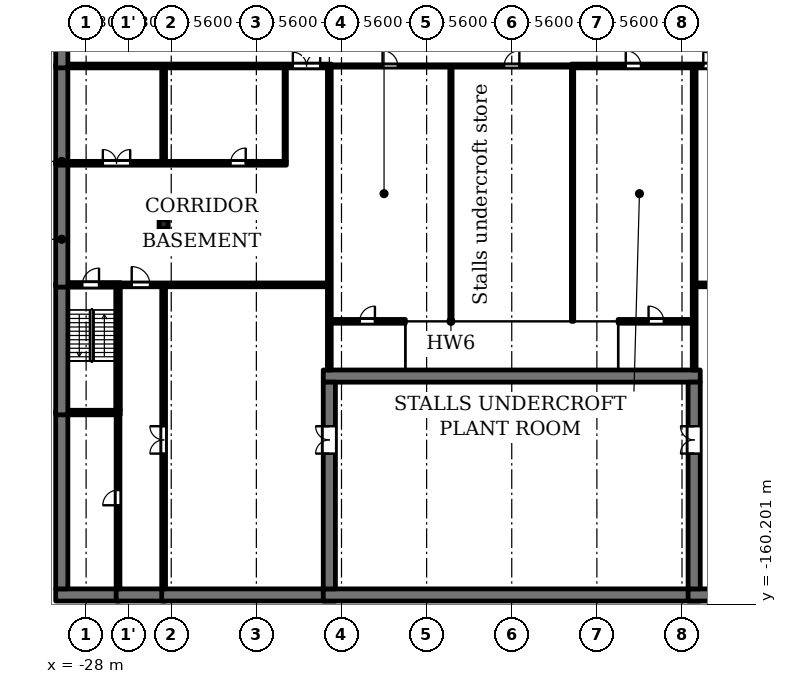
"""IFC4 building model, lengths in metres.
Left out: names, types, materials, properties, quantities, classifications, styles, units other than length and angle.
Written with IfcOpenShell. Run it as: python <this file> out.ifc"""

import sys

from ifc_helpers import new_model, si_unit, direction, frame, frame_2d, origin, origin_2d, place, context, subcontext, project, spatial, rectangle, extrude, element, fill, save


model = new_model("IFC4")
c1 = context("Model", 3, precision=1e-05, world=origin(), true_north=direction((0.0, 1.0)))
c2 = subcontext(c1, "Body", "Model", "MODEL_VIEW")
j1 = project(units=[si_unit("LENGTHUNIT", "METRE"), si_unit("PLANEANGLEUNIT", "RADIAN")], contexts=[c1])
p1 = place(None, origin())
s1 = spatial("IfcSite", under=j1, at=p1, CompositionType="ELEMENT")
p2 = place(p1, origin())
s2 = spatial("IfcBuilding", under=s1, at=p2, CompositionType="ELEMENT")
p3 = place(p2, frame((0.0, 0.0, -4.5)))
s3 = spatial("IfcBuildingStorey", under=s2, at=p3, CompositionType="ELEMENT", Elevation=-4.5)
p4 = place(p3, frame((-22.9, -135.2, 0.0), z_axis=(0.0, 0.0, 1.0), x_axis=(1.0, 0.0, 0.0)))
e1 = element("IfcColumn", 1, at=p4, inside=s3, PredefinedType="COLUMN", context=c2, shape_type="SweptSolid", body=[
    extrude(rectangle(XDim=0.6, YDim=0.6, at=origin_2d()), origin(), (0.0, 0.0, 1.0), 4.15),
])
p5 = place(p3, frame((-30.0, -159.6, 0.0), z_axis=(0.0, 0.0, 1.0), x_axis=(1.0, 0.0, 0.0)))
e2 = element("IfcWall", 2, at=p5, inside=s3, PredefinedType="SOLIDWALL", context=c2, shape_type="SweptSolid", body=[
    extrude(rectangle(XDim=4.225, YDim=0.8, at=frame_2d((2.112, 0.0))), origin(), (0.0, 0.0, 1.0), 4.15),
])
p6 = place(p3, frame((-26.025, -159.6, 0.0), z_axis=(0.0, 0.0, 1.0), x_axis=(1.0, 0.0, 0.0)))
e3 = element("IfcWall", 3, at=p6, inside=s3, PredefinedType="SOLIDWALL", context=c2, shape_type="SweptSolid", body=[
    extrude(rectangle(XDim=3.25, YDim=0.8, at=frame_2d((1.625, 0.0))), origin(), (0.0, 0.0, 1.0), 4.15),
])
p7 = place(p3, frame((-23.025, -159.6, 0.0), z_axis=(0.0, 0.0, 1.0), x_axis=(1.0, 0.0, 0.0)))
e4 = element("IfcWall", 4, at=p7, inside=s3, PredefinedType="SOLIDWALL", context=c2, shape_type="SweptSolid", body=[
    extrude(rectangle(XDim=11.425, YDim=0.8, at=frame_2d((5.712, 0.0))), origin(), (0.0, 0.0, 1.0), 4.15),
])
p8 = place(p3, frame((-12.4, -159.6, 0.0), z_axis=(0.0, 0.0, 1.0), x_axis=(1.0, 0.0, 0.0)))
e5 = element("IfcWall", 5, at=p8, inside=s3, PredefinedType="SOLIDWALL", context=c2, shape_type="SweptSolid", body=[
    extrude(rectangle(XDim=24.8, YDim=0.8, at=frame_2d((12.4, 0.0))), origin(), (0.0, 0.0, 1.0), 4.5),
])
p9 = place(p3, frame((11.6, -159.6, 0.0), z_axis=(0.0, 0.0, 1.0), x_axis=(1.0, 0.0, 0.0)))
e6 = element("IfcWall", 6, at=p9, inside=s3, PredefinedType="SOLIDWALL", context=c2, shape_type="SweptSolid", body=[
    extrude(rectangle(XDim=11.425, YDim=0.8, at=frame_2d((5.712, 0.0))), origin(), (0.0, 0.0, 1.0), 4.15),
])
p10 = place(p3, frame((-29.2, -147.6, 0.0), z_axis=(0.0, 0.0, 1.0), x_axis=(1.0, 0.0, 0.0)))
e7 = element("IfcWall", 7, at=p10, inside=s3, PredefinedType="SOLIDWALL", context=c2, shape_type="SweptSolid", body=[
    extrude(rectangle(XDim=3.45, YDim=0.3, at=frame_2d((1.725, 0.0))), origin(), (0.0, 0.0, 1.0), 4.15),
])
p11 = place(p3, frame((-12.4, -145.2, 0.0), z_axis=(0.0, 0.0, 1.0), x_axis=(1.0, 0.0, 0.0)))
e8 = element("IfcWall", 8, at=p11, inside=s3, PredefinedType="SOLIDWALL", context=c2, shape_type="SweptSolid", body=[
    extrude(rectangle(XDim=24.8, YDim=0.8, at=frame_2d((12.4, 0.0))), origin(), (0.0, 0.0, 1.0), 4.5),
])
p12 = place(p3, frame((-11.875, -141.6, 0.0), z_axis=(0.0, 0.0, 1.0), x_axis=(1.0, 0.0, 0.0)))
e9 = element("IfcWall", 9, at=p12, inside=s3, PredefinedType="SOLIDWALL", context=c2, shape_type="SweptSolid", body=[
    extrude(rectangle(XDim=4.875, YDim=0.25, at=frame_2d((2.438, 0.0))), origin(), (0.0, 0.0, 1.0), 3.2),
])
p13 = place(p12, frame((1.875, 0.0, 0.0)))
e10 = element("IfcOpeningElement", 10, at=p13, cuts=e9, PredefinedType="OPENING", context=c2, shape_type="SweptSolid", body=[
    extrude(rectangle(XDim=1.0, YDim=2.1, at=frame_2d((0.5, 1.05))), frame((0.0, 0.135, 0.0), z_axis=(0.0, -1.0, 0.0), x_axis=(1.0, 0.0, 0.0)), (0.0, 0.0, 1.0), 0.27),
])
p14 = place(p3, frame((7.0, -141.6, 0.0), z_axis=(0.0, 0.0, 1.0), x_axis=(1.0, 0.0, 0.0)))
e11 = element("IfcWall", 11, at=p14, inside=s3, PredefinedType="SOLIDWALL", context=c2, shape_type="SweptSolid", body=[
    extrude(rectangle(XDim=4.875, YDim=0.25, at=frame_2d((2.438, 0.0))), origin(), (0.0, 0.0, 1.0), 3.2),
])
p15 = place(p14, frame((2.0, 0.0, 0.0)))
e12 = element("IfcOpeningElement", 12, at=p15, cuts=e11, PredefinedType="OPENING", context=c2, shape_type="SweptSolid", body=[
    extrude(rectangle(XDim=1.0, YDim=2.1, at=frame_2d((0.5, 1.05))), frame((0.0, 0.135, 0.0), z_axis=(0.0, -1.0, 0.0), x_axis=(1.0, 0.0, 0.0)), (0.0, 0.0, 1.0), 0.27),
])
p16 = place(p3, frame((-29.2, -139.2, 0.0), z_axis=(0.0, 0.0, 1.0), x_axis=(1.0, 0.0, 0.0)))
e13 = element("IfcWall", 13, at=p16, inside=s3, PredefinedType="SOLIDWALL", context=c2, shape_type="SweptSolid", body=[
    extrude(rectangle(XDim=3.45, YDim=0.3, at=frame_2d((1.725, 0.0))), origin(), (0.0, 0.0, 1.0), 4.15),
])
p17 = place(p16, frame((0.95, 0.0, 0.0)))
e14 = element("IfcOpeningElement", 14, at=p17, cuts=e13, PredefinedType="OPENING", context=c2, shape_type="SweptSolid", body=[
    extrude(rectangle(XDim=1.1, YDim=2.1, at=frame_2d((0.55, 1.05))), frame((0.0, 0.16, 0.0), z_axis=(0.0, -1.0, 0.0), x_axis=(1.0, 0.0, 0.0)), (0.0, 0.0, 1.0), 0.32),
])
p18 = place(p3, frame((-25.75, -139.2, 0.0), z_axis=(0.0, 0.0, 1.0), x_axis=(1.0, 0.0, 0.0)))
e15 = element("IfcWall", 15, at=p18, inside=s3, PredefinedType="SOLIDWALL", context=c2, shape_type="SweptSolid", body=[
    extrude(rectangle(XDim=13.625, YDim=0.25, at=frame_2d((6.812, 0.0))), origin(), (0.0, 0.0, 1.0), 4.15),
])
p19 = place(p18, frame((0.75, 0.0, 0.0)))
e16 = element("IfcOpeningElement", 16, at=p19, cuts=e15, PredefinedType="OPENING", context=c2, shape_type="SweptSolid", body=[
    extrude(rectangle(XDim=1.2, YDim=2.1, at=frame_2d((0.6, 1.05))), frame((0.0, 0.135, 0.0), z_axis=(0.0, -1.0, 0.0), x_axis=(1.0, 0.0, 0.0)), (0.0, 0.0, 1.0), 0.27),
])
p20 = place(p3, frame((12.125, -139.2, 0.0), z_axis=(0.0, 0.0, 1.0), x_axis=(1.0, 0.0, 0.0)))
e17 = element("IfcWall", 17, at=p20, inside=s3, PredefinedType="SOLIDWALL", context=c2, shape_type="SweptSolid", body=[
    extrude(rectangle(XDim=13.625, YDim=0.25, at=frame_2d((6.812, 0.0))), origin(), (0.0, 0.0, 1.0), 4.15),
])
p21 = place(p20, frame((11.675, 0.0, 0.0)))
e18 = element("IfcOpeningElement", 18, at=p21, cuts=e17, PredefinedType="OPENING", context=c2, shape_type="SweptSolid", body=[
    extrude(rectangle(XDim=1.2, YDim=2.1, at=frame_2d((0.6, 1.05))), frame((0.0, 0.135, 0.0), z_axis=(0.0, -1.0, 0.0), x_axis=(1.0, 0.0, 0.0)), (0.0, 0.0, 1.0), 0.27),
])
p22 = place(p3, frame((-29.2, -131.2, 0.0), z_axis=(0.0, 0.0, 1.0), x_axis=(1.0, 0.0, 0.0)))
e19 = element("IfcWall", 19, at=p22, inside=s3, PredefinedType="SOLIDWALL", context=c2, shape_type="SweptSolid", body=[
    extrude(rectangle(XDim=14.375, YDim=0.25, at=frame_2d((7.188, 0.0))), origin(), (0.0, 0.0, 1.0), 4.15),
])
p23 = place(p22, frame((2.3, 0.0, 0.0)))
e20 = element("IfcOpeningElement", 20, at=p23, cuts=e19, PredefinedType="OPENING", context=c2, shape_type="SweptSolid", body=[
    extrude(rectangle(XDim=1.8, YDim=2.1, at=frame_2d((0.9, 1.05))), frame((0.0, 0.135, 0.0), z_axis=(0.0, -1.0, 0.0), x_axis=(1.0, 0.0, 0.0)), (0.0, 0.0, 1.0), 0.27),
])
p24 = place(p22, frame((10.7, 0.0, 0.0)))
e21 = element("IfcOpeningElement", 21, at=p24, cuts=e19, PredefinedType="OPENING", context=c2, shape_type="SweptSolid", body=[
    extrude(rectangle(XDim=1.0, YDim=2.1, at=frame_2d((0.5, 1.05))), frame((0.0, 0.135, 0.0), z_axis=(0.0, -1.0, 0.0), x_axis=(1.0, 0.0, 0.0)), (0.0, 0.0, 1.0), 0.27),
])
p25 = place(p3, frame((-29.2, -124.8, 0.0), z_axis=(0.0, 0.0, 1.0), x_axis=(1.0, 0.0, 0.0)))
e22 = element("IfcWall", 22, at=p25, inside=s3, PredefinedType="SOLIDWALL", context=c2, shape_type="SweptSolid", body=[
    extrude(rectangle(XDim=17.325, YDim=0.25, at=frame_2d((8.663, 0.0))), origin(), (0.0, 0.0, 1.0), 4.15),
])
p26 = place(p25, frame((14.8, 0.0, 0.0)))
e23 = element("IfcOpeningElement", 23, at=p26, cuts=e22, PredefinedType="OPENING", context=c2, shape_type="SweptSolid", body=[
    extrude(rectangle(XDim=1.8, YDim=2.1, at=frame_2d((0.9, 1.05))), frame((0.0, 0.135, 0.0), z_axis=(0.0, -1.0, 0.0), x_axis=(1.0, 0.0, 0.0)), (0.0, 0.0, 1.0), 0.27),
])
p27 = place(p3, frame((-11.875, -124.8, 0.0), z_axis=(0.0, 0.0, 1.0), x_axis=(1.0, 0.0, 0.0)))
e24 = element("IfcWall", 24, at=p27, inside=s3, PredefinedType="PARTITIONING", context=c2, shape_type="SweptSolid", body=[
    extrude(rectangle(XDim=15.95, YDim=0.15, at=frame_2d((7.975, 0.0))), origin(), (0.0, 0.0, 1.0), 4.15),
])
p28 = place(p27, frame((3.375, 0.0, 0.0)))
e25 = element("IfcOpeningElement", 25, at=p28, cuts=e24, PredefinedType="OPENING", context=c2, shape_type="SweptSolid", body=[
    extrude(rectangle(XDim=1.0, YDim=2.1, at=frame_2d((0.5, 1.05))), frame((0.0, 0.085, 0.0), z_axis=(0.0, -1.0, 0.0), x_axis=(1.0, 0.0, 0.0)), (0.0, 0.0, 1.0), 0.17),
])
p29 = place(p27, frame((11.375, 0.0, 0.0)))
e26 = element("IfcOpeningElement", 26, at=p29, cuts=e24, PredefinedType="OPENING", context=c2, shape_type="SweptSolid", body=[
    extrude(rectangle(XDim=1.0, YDim=2.1, at=frame_2d((0.5, 1.05))), frame((0.0, 0.085, 0.0), z_axis=(0.0, -1.0, 0.0), x_axis=(1.0, 0.0, 0.0)), (0.0, 0.0, 1.0), 0.17),
])
p30 = place(p3, frame((3.925, -124.8, 0.0), z_axis=(0.0, 0.0, 1.0), x_axis=(1.0, 0.0, 0.0)))
e27 = element("IfcWall", 27, at=p30, inside=s3, PredefinedType="SOLIDWALL", context=c2, shape_type="SweptSolid", body=[
    extrude(rectangle(XDim=25.275, YDim=0.25, at=frame_2d((12.637, 0.0))), origin(), (0.0, 0.0, 1.0), 4.15),
])
p31 = place(p30, frame((8.675, 0.0, 0.0)))
e28 = element("IfcOpeningElement", 28, at=p31, cuts=e27, PredefinedType="OPENING", context=c2, shape_type="SweptSolid", body=[
    extrude(rectangle(XDim=1.8, YDim=2.1, at=frame_2d((0.9, 1.05))), frame((0.0, 0.135, 0.0), z_axis=(0.0, -1.0, 0.0), x_axis=(1.0, 0.0, 0.0)), (0.0, 0.0, 1.0), 0.27),
])
p32 = place(p30, frame((3.575, 0.0, 0.0)))
e29 = element("IfcOpeningElement", 29, at=p32, cuts=e27, PredefinedType="OPENING", context=c2, shape_type="SweptSolid", body=[
    extrude(rectangle(XDim=1.0, YDim=2.1, at=frame_2d((0.5, 1.05))), frame((0.0, 0.135, 0.0), z_axis=(0.0, -1.0, 0.0), x_axis=(1.0, 0.0, 0.0)), (0.0, 0.0, 1.0), 0.27),
])
p33 = place(p3, frame((-29.6, -159.2, 0.0), z_axis=(0.0, 0.0, 1.0), x_axis=(0.0, 1.0, 0.0)))
e30 = element("IfcWall", 30, at=p33, inside=s3, PredefinedType="SOLIDWALL", context=c2, shape_type="SweptSolid", body=[
    extrude(rectangle(XDim=11.75, YDim=0.8, at=frame_2d((5.875, 0.0))), origin(), (0.0, 0.0, 1.0), 4.15),
])
p34 = place(p3, frame((-29.6, -147.75, 0.0), z_axis=(0.0, 0.0, 1.0), x_axis=(0.0, 1.0, 0.0)))
e31 = element("IfcWall", 31, at=p34, inside=s3, PredefinedType="SOLIDWALL", context=c2, shape_type="SweptSolid", body=[
    extrude(rectangle(XDim=8.7, YDim=0.8, at=frame_2d((4.35, 0.0))), origin(), (0.0, 0.0, 1.0), 4.15),
])
p35 = place(p3, frame((-29.6, -139.35, 0.0), z_axis=(0.0, 0.0, 1.0), x_axis=(0.0, 1.0, 0.0)))
e32 = element("IfcWall", 32, at=p35, inside=s3, PredefinedType="SOLIDWALL", context=c2, shape_type="SweptSolid", body=[
    extrude(rectangle(XDim=8.275, YDim=0.8, at=frame_2d((4.137, 0.0))), origin(), (0.0, 0.0, 1.0), 4.15),
])
p36 = place(p3, frame((-29.6, -131.325, 0.0), z_axis=(0.0, 0.0, 1.0), x_axis=(0.0, 1.0, 0.0)))
e33 = element("IfcWall", 33, at=p36, inside=s3, PredefinedType="SOLIDWALL", context=c2, shape_type="SweptSolid", body=[
    extrude(rectangle(XDim=6.65, YDim=0.8, at=frame_2d((3.325, 0.0))), origin(), (0.0, 0.0, 1.0), 4.15),
])
p37 = place(p3, frame((-29.6, -124.925, 0.0), z_axis=(0.0, 0.0, 1.0), x_axis=(0.0, 1.0, 0.0)))
e34 = element("IfcWall", 34, at=p37, inside=s3, PredefinedType="SOLIDWALL", context=c2, shape_type="SweptSolid", body=[
    extrude(rectangle(XDim=3.875, YDim=0.8, at=frame_2d((1.938, 0.0))), origin(), (0.0, 0.0, 1.0), 4.15),
])
p38 = place(p3, frame((-25.9, -159.2, 0.0), z_axis=(0.0, 0.0, 1.0), x_axis=(0.0, 1.0, 0.0)))
e35 = element("IfcWall", 35, at=p38, inside=s3, PredefinedType="SOLIDWALL", context=c2, shape_type="SweptSolid", body=[
    extrude(rectangle(XDim=11.45, YDim=0.25, at=frame_2d((5.725, 0.0))), origin(), (0.0, 0.0, 1.0), 4.15),
])
p39 = place(p38, frame((5.5, 0.0, 0.0)))
e36 = element("IfcOpeningElement", 36, at=p39, cuts=e35, PredefinedType="OPENING", context=c2, shape_type="SweptSolid", body=[
    extrude(rectangle(XDim=1.0, YDim=2.1, at=frame_2d((0.5, 1.05))), frame((0.0, 0.135, 0.0), z_axis=(0.0, -1.0, 0.0), x_axis=(1.0, 0.0, 0.0)), (0.0, 0.0, 1.0), 0.27),
])
p40 = place(p3, frame((-25.9, -147.45, 0.0), z_axis=(0.0, 0.0, 1.0), x_axis=(0.0, 1.0, 0.0)))
e37 = element("IfcWall", 37, at=p40, inside=s3, PredefinedType="SOLIDWALL", context=c2, shape_type="SweptSolid", body=[
    extrude(rectangle(XDim=8.225, YDim=0.3, at=frame_2d((4.112, 0.0))), origin(), (0.0, 0.0, 1.0), 4.15),
])
p41 = place(p3, frame((-22.9, -159.2, 0.0), z_axis=(0.0, 0.0, 1.0), x_axis=(0.0, 1.0, 0.0)))
e38 = element("IfcWall", 38, at=p41, inside=s3, PredefinedType="SOLIDWALL", context=c2, shape_type="SweptSolid", body=[
    extrude(rectangle(XDim=19.875, YDim=0.25, at=frame_2d((9.938, 0.0))), origin(), (0.0, 0.0, 1.0), 4.15),
])
p42 = place(p41, frame((8.9, 0.0, 0.0)))
e39 = element("IfcOpeningElement", 39, at=p42, cuts=e38, PredefinedType="OPENING", context=c2, shape_type="SweptSolid", body=[
    extrude(rectangle(XDim=1.8, YDim=2.1, at=frame_2d((0.9, 1.05))), frame((0.0, 0.135, 0.0), z_axis=(0.0, -1.0, 0.0), x_axis=(1.0, 0.0, 0.0)), (0.0, 0.0, 1.0), 0.27),
])
p43 = place(p3, frame((-22.9, -131.075, 0.0), z_axis=(0.0, 0.0, 1.0), x_axis=(0.0, 1.0, 0.0)))
e40 = element("IfcWall", 40, at=p43, inside=s3, PredefinedType="SOLIDWALL", context=c2, shape_type="SweptSolid", body=[
    extrude(rectangle(XDim=6.15, YDim=0.25, at=frame_2d((3.075, 0.0))), origin(), (0.0, 0.0, 1.0), 4.15),
])
p44 = place(p3, frame((-14.9, -131.075, 0.0), z_axis=(0.0, 0.0, 1.0), x_axis=(0.0, 1.0, 0.0)))
e41 = element("IfcWall", 41, at=p44, inside=s3, PredefinedType="PARTITIONING", context=c2, shape_type="SweptSolid", body=[
    extrude(rectangle(XDim=6.15, YDim=0.15, at=frame_2d((3.075, 0.0))), origin(), (0.0, 0.0, 1.0), 4.15),
])
p45 = place(p3, frame((-12.0, -159.2, 0.0), z_axis=(0.0, 0.0, 1.0), x_axis=(0.0, 1.0, 0.0)))
e42 = element("IfcWall", 42, at=p45, inside=s3, PredefinedType="SOLIDWALL", context=c2, shape_type="SweptSolid", body=[
    extrude(rectangle(XDim=13.6, YDim=0.8, at=frame_2d((6.8, 0.0))), origin(), (0.0, 0.0, 1.0), 4.5),
])
p46 = place(p45, frame((8.9, 0.0, 0.0)))
e43 = element("IfcOpeningElement", 43, at=p46, cuts=e42, PredefinedType="OPENING", context=c2, shape_type="SweptSolid", body=[
    extrude(rectangle(XDim=1.8, YDim=2.1, at=frame_2d((0.9, 1.05))), frame((0.0, 0.41, 0.0), z_axis=(0.0, -1.0, 0.0), x_axis=(1.0, 0.0, 0.0)), (0.0, 0.0, 1.0), 0.82),
])
p47 = place(p3, frame((-12.0, -144.8, 0.0), z_axis=(0.0, 0.0, 1.0), x_axis=(0.0, 1.0, 0.0)))
e44 = element("IfcWall", 44, at=p47, inside=s3, PredefinedType="SOLIDWALL", context=c2, shape_type="SweptSolid", body=[
    extrude(rectangle(XDim=19.95, YDim=0.25, at=frame_2d((9.975, 0.0))), origin(), (0.0, 0.0, 1.0), 4.15),
])
p48 = place(p3, frame((-4.0, -141.6, 0.0), z_axis=(0.0, 0.0, 1.0), x_axis=(0.0, 1.0, 0.0)))
e45 = element("IfcWall", 45, at=p48, inside=s3, PredefinedType="PARTITIONING", context=c2, shape_type="SweptSolid", body=[
    extrude(rectangle(XDim=16.725, YDim=0.15, at=frame_2d((8.363, 0.0))), origin(), (0.0, 0.0, 1.0), 4.15),
])
p49 = place(p3, frame((4.0, -141.6, 0.0), z_axis=(0.0, 0.0, 1.0), x_axis=(0.0, 1.0, 0.0)))
e46 = element("IfcWall", 46, at=p49, inside=s3, PredefinedType="PARTITIONING", context=c2, shape_type="SweptSolid", body=[
    extrude(rectangle(XDim=16.675, YDim=0.15, at=frame_2d((8.337, 0.0))), origin(), (0.0, 0.0, 1.0), 4.15),
])
p50 = place(p3, frame((12.0, -159.2, 0.0), z_axis=(0.0, 0.0, 1.0), x_axis=(0.0, 1.0, 0.0)))
e47 = element("IfcWall", 47, at=p50, inside=s3, PredefinedType="SOLIDWALL", context=c2, shape_type="SweptSolid", body=[
    extrude(rectangle(XDim=13.6, YDim=0.8, at=frame_2d((6.8, 0.0))), origin(), (0.0, 0.0, 1.0), 4.5),
])
p51 = place(p50, frame((8.9, 0.0, 0.0)))
e48 = element("IfcOpeningElement", 48, at=p51, cuts=e47, PredefinedType="OPENING", context=c2, shape_type="SweptSolid", body=[
    extrude(rectangle(XDim=1.8, YDim=2.1, at=frame_2d((0.9, 1.05))), frame((0.0, 0.41, 0.0), z_axis=(0.0, -1.0, 0.0), x_axis=(1.0, 0.0, 0.0)), (0.0, 0.0, 1.0), 0.82),
])
p52 = place(p3, frame((12.0, -144.8, 0.0), z_axis=(0.0, 0.0, 1.0), x_axis=(0.0, 1.0, 0.0)))
e49 = element("IfcWall", 49, at=p52, inside=s3, PredefinedType="SOLIDWALL", context=c2, shape_type="SweptSolid", body=[
    extrude(rectangle(XDim=19.875, YDim=0.25, at=frame_2d((9.938, 0.0))), origin(), (0.0, 0.0, 1.0), 4.15),
])
p53 = place(p17, origin())
e50 = element("IfcDoor", 50, at=p53, inside=s3, OperationType="SINGLE_SWING_RIGHT", PredefinedType="DOOR", context=c2, shape_type="SweptSolid", body=[
    extrude(rectangle(XDim=1.1, YDim=2.1, at=frame_2d((0.55, 1.05))), frame((0.0, 0.025, 0.0), z_axis=(0.0, -1.0, 0.0), x_axis=(1.0, 0.0, 0.0)), (0.0, 0.0, 1.0), 0.05),
])
fill(e14, e50)
p54 = place(p26, origin())
e51 = element("IfcDoor", 51, at=p54, inside=s3, OperationType="DOUBLE_DOOR_SINGLE_SWING", PredefinedType="DOOR", context=c2, shape_type="SweptSolid", body=[
    extrude(rectangle(XDim=1.8, YDim=2.1, at=frame_2d((0.9, 1.05))), frame((0.0, 0.025, 0.0), z_axis=(0.0, -1.0, 0.0), x_axis=(1.0, 0.0, 0.0)), (0.0, 0.0, 1.0), 0.05),
])
fill(e23, e51)
p55 = place(p31, origin())
e52 = element("IfcDoor", 52, at=p55, inside=s3, OperationType="DOUBLE_DOOR_SINGLE_SWING", PredefinedType="DOOR", context=c2, shape_type="SweptSolid", body=[
    extrude(rectangle(XDim=1.8, YDim=2.1, at=frame_2d((0.9, 1.05))), frame((0.0, 0.025, 0.0), z_axis=(0.0, -1.0, 0.0), x_axis=(1.0, 0.0, 0.0)), (0.0, 0.0, 1.0), 0.05),
])
fill(e28, e52)
p56 = place(p23, origin())
e53 = element("IfcDoor", 53, at=p56, inside=s3, OperationType="DOUBLE_DOOR_SINGLE_SWING", PredefinedType="DOOR", context=c2, shape_type="SweptSolid", body=[
    extrude(rectangle(XDim=1.8, YDim=2.1, at=frame_2d((0.9, 1.05))), frame((0.0, 0.025, 0.0), z_axis=(0.0, -1.0, 0.0), x_axis=(1.0, 0.0, 0.0)), (0.0, 0.0, 1.0), 0.05),
])
fill(e20, e53)
p57 = place(p24, origin())
e54 = element("IfcDoor", 54, at=p57, inside=s3, OperationType="SINGLE_SWING_RIGHT", PredefinedType="DOOR", context=c2, shape_type="SweptSolid", body=[
    extrude(rectangle(XDim=1.0, YDim=2.1, at=frame_2d((0.5, 1.05))), frame((0.0, 0.025, 0.0), z_axis=(0.0, -1.0, 0.0), x_axis=(1.0, 0.0, 0.0)), (0.0, 0.0, 1.0), 0.05),
])
fill(e21, e54)
p58 = place(p19, origin())
e55 = element("IfcDoor", 55, at=p58, inside=s3, OperationType="SINGLE_SWING_LEFT", PredefinedType="DOOR", context=c2, shape_type="SweptSolid", body=[
    extrude(rectangle(XDim=1.2, YDim=2.1, at=frame_2d((0.6, 1.05))), frame((0.0, 0.025, 0.0), z_axis=(0.0, -1.0, 0.0), x_axis=(1.0, 0.0, 0.0)), (0.0, 0.0, 1.0), 0.05),
])
fill(e16, e55)
p59 = place(p39, origin())
e56 = element("IfcDoor", 56, at=p59, inside=s3, OperationType="SINGLE_SWING_LEFT", PredefinedType="DOOR", context=c2, shape_type="SweptSolid", body=[
    extrude(rectangle(XDim=1.0, YDim=2.1, at=frame_2d((0.5, 1.05))), frame((0.0, 0.025, 0.0), z_axis=(0.0, -1.0, 0.0), x_axis=(1.0, 0.0, 0.0)), (0.0, 0.0, 1.0), 0.05),
])
fill(e36, e56)
p60 = place(p42, origin())
e57 = element("IfcDoor", 57, at=p60, inside=s3, OperationType="DOUBLE_DOOR_SINGLE_SWING", PredefinedType="DOOR", context=c2, shape_type="SweptSolid", body=[
    extrude(rectangle(XDim=1.8, YDim=2.1, at=frame_2d((0.9, 1.05))), frame((0.0, 0.025, 0.0), z_axis=(0.0, -1.0, 0.0), x_axis=(1.0, 0.0, 0.0)), (0.0, 0.0, 1.0), 0.05),
])
fill(e39, e57)
p61 = place(p28, origin())
e58 = element("IfcDoor", 58, at=p61, inside=s3, OperationType="SINGLE_SWING_LEFT", PredefinedType="DOOR", context=c2, shape_type="SweptSolid", body=[
    extrude(rectangle(XDim=1.0, YDim=2.1, at=frame_2d((0.5, 1.05))), frame((0.0, 0.025, 0.0), z_axis=(0.0, -1.0, 0.0), x_axis=(1.0, 0.0, 0.0)), (0.0, 0.0, 1.0), 0.05),
])
fill(e25, e58)
p62 = place(p29, origin())
e59 = element("IfcDoor", 59, at=p62, inside=s3, OperationType="SINGLE_SWING_RIGHT", PredefinedType="DOOR", context=c2, shape_type="SweptSolid", body=[
    extrude(rectangle(XDim=1.0, YDim=2.1, at=frame_2d((0.5, 1.05))), frame((0.0, 0.025, 0.0), z_axis=(0.0, -1.0, 0.0), x_axis=(1.0, 0.0, 0.0)), (0.0, 0.0, 1.0), 0.05),
])
fill(e26, e59)
p63 = place(p32, origin())
e60 = element("IfcDoor", 60, at=p63, inside=s3, OperationType="SINGLE_SWING_LEFT", PredefinedType="DOOR", context=c2, shape_type="SweptSolid", body=[
    extrude(rectangle(XDim=1.0, YDim=2.1, at=frame_2d((0.5, 1.05))), frame((0.0, 0.025, 0.0), z_axis=(0.0, -1.0, 0.0), x_axis=(1.0, 0.0, 0.0)), (0.0, 0.0, 1.0), 0.05),
])
fill(e29, e60)
p64 = place(p13, origin())
e61 = element("IfcDoor", 61, at=p64, inside=s3, OperationType="SINGLE_SWING_RIGHT", PredefinedType="DOOR", context=c2, shape_type="SweptSolid", body=[
    extrude(rectangle(XDim=1.0, YDim=2.1, at=frame_2d((0.5, 1.05))), frame((0.0, 0.025, 0.0), z_axis=(0.0, -1.0, 0.0), x_axis=(1.0, 0.0, 0.0)), (0.0, 0.0, 1.0), 0.05),
])
fill(e10, e61)
p65 = place(p15, origin())
e62 = element("IfcDoor", 62, at=p65, inside=s3, OperationType="SINGLE_SWING_LEFT", PredefinedType="DOOR", context=c2, shape_type="SweptSolid", body=[
    extrude(rectangle(XDim=1.0, YDim=2.1, at=frame_2d((0.5, 1.05))), frame((0.0, 0.025, 0.0), z_axis=(0.0, -1.0, 0.0), x_axis=(1.0, 0.0, 0.0)), (0.0, 0.0, 1.0), 0.05),
])
fill(e12, e62)
p66 = place(p46, origin())
e63 = element("IfcDoor", 63, at=p66, inside=s3, OperationType="DOUBLE_DOOR_SINGLE_SWING", PredefinedType="DOOR", context=c2, shape_type="SweptSolid", body=[
    extrude(rectangle(XDim=1.8, YDim=2.1, at=frame_2d((0.9, 1.05))), frame((0.0, 0.025, 0.0), z_axis=(0.0, -1.0, 0.0), x_axis=(1.0, 0.0, 0.0)), (0.0, 0.0, 1.0), 0.05),
])
fill(e43, e63)
p67 = place(p51, origin())
e64 = element("IfcDoor", 64, at=p67, inside=s3, OperationType="DOUBLE_DOOR_SINGLE_SWING", PredefinedType="DOOR", context=c2, shape_type="SweptSolid", body=[
    extrude(rectangle(XDim=1.8, YDim=2.1, at=frame_2d((0.9, 1.05))), frame((0.0, 0.025, 0.0), z_axis=(0.0, -1.0, 0.0), x_axis=(1.0, 0.0, 0.0)), (0.0, 0.0, 1.0), 0.05),
])
fill(e48, e64)
save(model, sys.argv[1])
